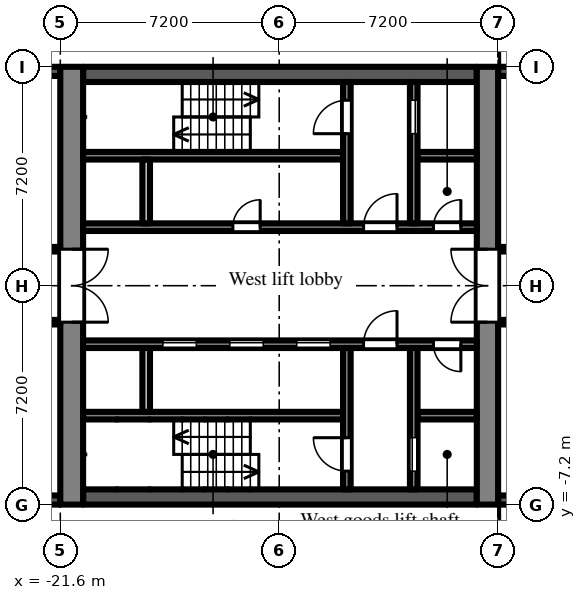
"""IFC4 building model, lengths in metres.
Left out: names, types, materials, properties, quantities, classifications, styles, units other than length and angle.
Written with IfcOpenShell. Run it as: python <this file> out.ifc"""

import sys

from ifc_helpers import new_model, si_unit, direction, frame, frame_2d, origin, place, context, subcontext, project, spatial, rectangle, extrude, element, fill, save


model = new_model("IFC4")
c1 = context("Model", 3, precision=1e-05, world=origin(), true_north=direction((0.0, 1.0)))
c2 = subcontext(c1, "Body", "Model", "MODEL_VIEW")
j1 = project(units=[si_unit("LENGTHUNIT", "METRE"), si_unit("PLANEANGLEUNIT", "RADIAN")], contexts=[c1])
p1 = place(None, origin())
s1 = spatial("IfcSite", under=j1, at=p1, CompositionType="ELEMENT")
p2 = place(p1, origin())
s2 = spatial("IfcBuilding", under=s1, at=p2, CompositionType="ELEMENT")
p3 = place(p2, frame((0.0, 0.0, 11.7)))
s3 = spatial("IfcBuildingStorey", under=s2, at=p3, CompositionType="ELEMENT", Elevation=11.7)
p4 = place(p3, frame((-4.2, 7.05, 0.0), z_axis=(0.0, 0.0, 1.0), x_axis=(-1.0, 0.0, 0.0)))
e1 = element("IfcWall", 1, at=p4, inside=s3, PredefinedType="SOLIDWALL", context=c2, shape_type="SweptSolid", body=[
    extrude(rectangle(XDim=3.0, YDim=0.3, at=frame_2d((1.5, 0.0))), origin(), (0.0, 0.0, 1.0), 2.1),
])
p5 = place(p3, frame((-21.6, 7.05, 0.0), z_axis=(0.0, 0.0, 1.0), x_axis=(-1.0, 0.0, 0.0)))
e2 = element("IfcWall", 2, at=p5, inside=s3, PredefinedType="SOLIDWALL", context=c2, shape_type="SweptSolid", body=[
    extrude(rectangle(XDim=2.7, YDim=0.3, at=frame_2d((1.35, 0.0))), origin(), (0.0, 0.0, 1.0), 2.1),
])
p6 = place(p5, frame((0.75, 0.0, 0.2)))
e3 = element("IfcOpeningElement", 3, at=p6, cuts=e2, PredefinedType="OPENING", context=c2, shape_type="SweptSolid", body=[
    extrude(rectangle(XDim=1.2, YDim=1.85, at=frame_2d((0.6, 0.925))), frame((0.0, 0.16, 0.0), z_axis=(0.0, -1.0, 0.0), x_axis=(1.0, 0.0, 0.0)), (0.0, 0.0, 1.0), 0.32),
])
p7 = place(p3, frame((-24.3, -7.05, 0.0), z_axis=(0.0, 0.0, 1.0), x_axis=(1.0, 0.0, 0.0)))
e4 = element("IfcWall", 4, at=p7, inside=s3, PredefinedType="SOLIDWALL", context=c2, shape_type="SweptSolid", body=[
    extrude(rectangle(XDim=2.7, YDim=0.3, at=frame_2d((1.35, 0.0))), origin(), (0.0, 0.0, 1.0), 2.1),
])
p8 = place(p7, frame((0.75, 0.0, 0.2)))
e5 = element("IfcOpeningElement", 5, at=p8, cuts=e4, PredefinedType="OPENING", context=c2, shape_type="SweptSolid", body=[
    extrude(rectangle(XDim=1.2, YDim=1.85, at=frame_2d((0.6, 0.925))), frame((0.0, 0.16, 0.0), z_axis=(0.0, -1.0, 0.0), x_axis=(1.0, 0.0, 0.0)), (0.0, 0.0, 1.0), 0.32),
])
p9 = place(p3, frame((-7.2, -7.05, 0.0), z_axis=(0.0, 0.0, 1.0), x_axis=(1.0, 0.0, 0.0)))
e6 = element("IfcWall", 6, at=p9, inside=s3, PredefinedType="SOLIDWALL", context=c2, shape_type="SweptSolid", body=[
    extrude(rectangle(XDim=3.0, YDim=0.3, at=frame_2d((1.5, 0.0))), origin(), (0.0, 0.0, 1.0), 2.1),
])
p10 = place(p3, frame((-7.55, -7.2, 0.0), z_axis=(0.0, 0.0, 1.0), x_axis=(0.0, 1.0, 0.0)))
e7 = element("IfcWall", 7, at=p10, inside=s3, PredefinedType="SHEAR", context=c2, shape_type="SweptSolid", body=[
    extrude(rectangle(XDim=14.4, YDim=0.7, at=frame_2d((7.2, 0.0))), origin(), (0.0, 0.0, 1.0), 2.575),
])
p11 = place(p10, frame((6.0, 0.0, 0.0)))
e8 = element("IfcOpeningElement", 8, at=p11, cuts=e7, PredefinedType="OPENING", context=c2, shape_type="SweptSolid", body=[
    extrude(rectangle(XDim=2.4, YDim=2.2, at=frame_2d((1.2, 1.1))), frame((0.0, 0.36, 0.0), z_axis=(0.0, -1.0, 0.0), x_axis=(1.0, 0.0, 0.0)), (0.0, 0.0, 1.0), 0.72),
])
p12 = place(p3, frame((-21.225, -7.2, 0.0), z_axis=(0.0, 0.0, 1.0), x_axis=(0.0, 1.0, 0.0)))
e9 = element("IfcWall", 9, at=p12, inside=s3, PredefinedType="SHEAR", context=c2, shape_type="SweptSolid", body=[
    extrude(rectangle(XDim=14.4, YDim=0.75, at=frame_2d((7.2, 0.0))), origin(), (0.0, 0.0, 1.0), 2.575),
])
p13 = place(p12, frame((6.0, 0.0, 0.0)))
e10 = element("IfcOpeningElement", 10, at=p13, cuts=e9, PredefinedType="OPENING", context=c2, shape_type="SweptSolid", body=[
    extrude(rectangle(XDim=2.4, YDim=2.2, at=frame_2d((1.2, 1.1))), frame((0.0, 0.385, 0.0), z_axis=(0.0, -1.0, 0.0), x_axis=(1.0, 0.0, 0.0)), (0.0, 0.0, 1.0), 0.77),
])
p14 = place(p3, frame((-7.9, 6.95, 0.0), z_axis=(0.0, 0.0, 1.0), x_axis=(-1.0, 0.0, 0.0)))
e11 = element("IfcWall", 11, at=p14, inside=s3, PredefinedType="SHEAR", context=c2, shape_type="SweptSolid", body=[
    extrude(rectangle(XDim=12.95, YDim=0.5, at=frame_2d((6.475, 0.0))), origin(), (0.0, 0.0, 1.0), 2.575),
])
p15 = place(p3, frame((-7.9, 1.925, 0.0), z_axis=(0.0, 0.0, 1.0), x_axis=(-1.0, 0.0, 0.0)))
e12 = element("IfcWall", 12, at=p15, inside=s3, PredefinedType="SHEAR", context=c2, shape_type="SweptSolid", body=[
    extrude(rectangle(XDim=12.95, YDim=0.25, at=frame_2d((6.475, 0.0))), origin(), (0.0, 0.0, 1.0), 2.575),
])
p16 = place(p15, frame((0.525, 0.0, 0.0)))
e13 = element("IfcOpeningElement", 13, at=p16, cuts=e12, PredefinedType="OPENING", context=c2, shape_type="SweptSolid", body=[
    extrude(rectangle(XDim=0.9, YDim=2.1, at=frame_2d((0.45, 1.05))), frame((0.0, 0.135, 0.0), z_axis=(0.0, -1.0, 0.0), x_axis=(1.0, 0.0, 0.0)), (0.0, 0.0, 1.0), 0.27),
])
p17 = place(p15, frame((2.625, 0.0, 0.0)))
e14 = element("IfcOpeningElement", 14, at=p17, cuts=e12, PredefinedType="OPENING", context=c2, shape_type="SweptSolid", body=[
    extrude(rectangle(XDim=1.1, YDim=2.1, at=frame_2d((0.55, 1.05))), frame((0.0, 0.135, 0.0), z_axis=(0.0, -1.0, 0.0), x_axis=(1.0, 0.0, 0.0)), (0.0, 0.0, 1.0), 0.27),
])
p18 = place(p15, frame((7.125, 0.0, 0.0)))
e15 = element("IfcOpeningElement", 15, at=p18, cuts=e12, PredefinedType="OPENING", context=c2, shape_type="SweptSolid", body=[
    extrude(rectangle(XDim=0.9, YDim=2.1, at=frame_2d((0.45, 1.05))), frame((0.0, 0.135, 0.0), z_axis=(0.0, -1.0, 0.0), x_axis=(1.0, 0.0, 0.0)), (0.0, 0.0, 1.0), 0.27),
])
p19 = place(p3, frame((-7.9, 4.275, 0.0), z_axis=(0.0, 0.0, 1.0), x_axis=(-1.0, 0.0, 0.0)))
e16 = element("IfcWall", 16, at=p19, inside=s3, PredefinedType="SHEAR", context=c2, shape_type="SweptSolid", body=[
    extrude(rectangle(XDim=1.95, YDim=0.25, at=frame_2d((0.975, 0.0))), origin(), (0.0, 0.0, 1.0), 2.575),
])
p20 = place(p3, frame((-12.3, 4.275, 0.0), z_axis=(0.0, 0.0, 1.0), x_axis=(-1.0, 0.0, 0.0)))
e17 = element("IfcWall", 17, at=p20, inside=s3, PredefinedType="SHEAR", context=c2, shape_type="SweptSolid", body=[
    extrude(rectangle(XDim=8.55, YDim=0.25, at=frame_2d((4.275, 0.0))), origin(), (0.0, 0.0, 1.0), 2.575),
])
p21 = place(p3, frame((-9.975, 2.05, 0.0), z_axis=(0.0, 0.0, 1.0), x_axis=(0.0, 1.0, 0.0)))
e18 = element("IfcWall", 18, at=p21, inside=s3, PredefinedType="SHEAR", context=c2, shape_type="SweptSolid", body=[
    extrude(rectangle(XDim=4.65, YDim=0.25, at=frame_2d((2.325, 0.0))), origin(), (0.0, 0.0, 1.0), 2.575),
])
p22 = place(p21, frame((2.95, 0.0, 0.0)))
e19 = element("IfcOpeningElement", 19, at=p22, cuts=e18, PredefinedType="OPENING", context=c2, shape_type="SweptSolid", body=[
    extrude(rectangle(XDim=1.1, YDim=2.1, at=frame_2d((0.55, 1.05))), frame((0.0, 0.135, 0.0), z_axis=(0.0, -1.0, 0.0), x_axis=(1.0, 0.0, 0.0)), (0.0, 0.0, 1.0), 0.27),
])
p23 = place(p3, frame((-12.175, 2.05, 0.0), z_axis=(0.0, 0.0, 1.0), x_axis=(0.0, 1.0, 0.0)))
e20 = element("IfcWall", 20, at=p23, inside=s3, PredefinedType="SHEAR", context=c2, shape_type="SweptSolid", body=[
    extrude(rectangle(XDim=4.65, YDim=0.25, at=frame_2d((2.325, 0.0))), origin(), (0.0, 0.0, 1.0), 2.575),
])
p24 = place(p23, frame((2.95, 0.0, 0.0)))
e21 = element("IfcOpeningElement", 21, at=p24, cuts=e20, PredefinedType="OPENING", context=c2, shape_type="SweptSolid", body=[
    extrude(rectangle(XDim=1.1, YDim=2.1, at=frame_2d((0.55, 1.05))), frame((0.0, 0.135, 0.0), z_axis=(0.0, -1.0, 0.0), x_axis=(1.0, 0.0, 0.0)), (0.0, 0.0, 1.0), 0.27),
])
p25 = place(p3, frame((-18.775, 2.05, 0.0), z_axis=(0.0, 0.0, 1.0), x_axis=(0.0, 1.0, 0.0)))
e22 = element("IfcWall", 22, at=p25, inside=s3, PredefinedType="PARTITIONING", context=c2, shape_type="SweptSolid", body=[
    extrude(rectangle(XDim=2.1, YDim=0.25, at=frame_2d((1.05, 0.0))), origin(), (0.0, 0.0, 1.0), 2.575),
])
p26 = place(p3, frame((-7.9, -6.95, 0.0), z_axis=(0.0, 0.0, 1.0), x_axis=(-1.0, 0.0, 0.0)))
e23 = element("IfcWall", 23, at=p26, inside=s3, PredefinedType="SHEAR", context=c2, shape_type="SweptSolid", body=[
    extrude(rectangle(XDim=12.95, YDim=0.5, at=frame_2d((6.475, 0.0))), origin(), (0.0, 0.0, 1.0), 2.575),
])
p27 = place(p3, frame((-7.9, -1.925, 0.0), z_axis=(0.0, 0.0, 1.0), x_axis=(-1.0, 0.0, 0.0)))
e24 = element("IfcWall", 24, at=p27, inside=s3, PredefinedType="SHEAR", context=c2, shape_type="SweptSolid", body=[
    extrude(rectangle(XDim=12.95, YDim=0.25, at=frame_2d((6.475, 0.0))), origin(), (0.0, 0.0, 1.0), 2.575),
])
p28 = place(p27, frame((4.825, 0.0, 0.0)))
e25 = element("IfcOpeningElement", 25, at=p28, cuts=e24, PredefinedType="OPENING", context=c2, shape_type="SweptSolid", body=[
    extrude(rectangle(XDim=1.1, YDim=2.1, at=frame_2d((0.55, 1.05))), frame((0.0, 0.135, 0.0), z_axis=(0.0, -1.0, 0.0), x_axis=(1.0, 0.0, 0.0)), (0.0, 0.0, 1.0), 0.27),
])
p29 = place(p27, frame((7.025, 0.0, 0.0)))
e26 = element("IfcOpeningElement", 26, at=p29, cuts=e24, PredefinedType="OPENING", context=c2, shape_type="SweptSolid", body=[
    extrude(rectangle(XDim=1.1, YDim=2.1, at=frame_2d((0.55, 1.05))), frame((0.0, 0.135, 0.0), z_axis=(0.0, -1.0, 0.0), x_axis=(1.0, 0.0, 0.0)), (0.0, 0.0, 1.0), 0.27),
])
p30 = place(p27, frame((9.225, 0.0, 0.0)))
e27 = element("IfcOpeningElement", 27, at=p30, cuts=e24, PredefinedType="OPENING", context=c2, shape_type="SweptSolid", body=[
    extrude(rectangle(XDim=1.1, YDim=2.1, at=frame_2d((0.55, 1.05))), frame((0.0, 0.135, 0.0), z_axis=(0.0, -1.0, 0.0), x_axis=(1.0, 0.0, 0.0)), (0.0, 0.0, 1.0), 0.27),
])
p31 = place(p27, frame((0.525, 0.0, 0.0)))
e28 = element("IfcOpeningElement", 28, at=p31, cuts=e24, PredefinedType="OPENING", context=c2, shape_type="SweptSolid", body=[
    extrude(rectangle(XDim=0.9, YDim=2.1, at=frame_2d((0.45, 1.05))), frame((0.0, 0.135, 0.0), z_axis=(0.0, -1.0, 0.0), x_axis=(1.0, 0.0, 0.0)), (0.0, 0.0, 1.0), 0.27),
])
p32 = place(p27, frame((2.625, 0.0, 0.0)))
e29 = element("IfcOpeningElement", 29, at=p32, cuts=e24, PredefinedType="OPENING", context=c2, shape_type="SweptSolid", body=[
    extrude(rectangle(XDim=1.1, YDim=2.1, at=frame_2d((0.55, 1.05))), frame((0.0, 0.135, 0.0), z_axis=(0.0, -1.0, 0.0), x_axis=(1.0, 0.0, 0.0)), (0.0, 0.0, 1.0), 0.27),
])
p33 = place(p3, frame((-7.9, -4.275, 0.0), z_axis=(0.0, 0.0, 1.0), x_axis=(-1.0, 0.0, 0.0)))
e30 = element("IfcWall", 30, at=p33, inside=s3, PredefinedType="SHEAR", context=c2, shape_type="SweptSolid", body=[
    extrude(rectangle(XDim=1.95, YDim=0.25, at=frame_2d((0.975, 0.0))), origin(), (0.0, 0.0, 1.0), 2.575),
])
p34 = place(p3, frame((-12.3, -4.275, 0.0), z_axis=(0.0, 0.0, 1.0), x_axis=(-1.0, 0.0, 0.0)))
e31 = element("IfcWall", 31, at=p34, inside=s3, PredefinedType="SHEAR", context=c2, shape_type="SweptSolid", body=[
    extrude(rectangle(XDim=8.55, YDim=0.25, at=frame_2d((4.275, 0.0))), origin(), (0.0, 0.0, 1.0), 2.575),
])
p35 = place(p3, frame((-9.975, -2.05, 0.0), z_axis=(0.0, 0.0, 1.0), x_axis=(0.0, -1.0, 0.0)))
e32 = element("IfcWall", 32, at=p35, inside=s3, PredefinedType="SHEAR", context=c2, shape_type="SweptSolid", body=[
    extrude(rectangle(XDim=4.65, YDim=0.25, at=frame_2d((2.325, 0.0))), origin(), (0.0, 0.0, 1.0), 2.575),
])
p36 = place(p35, frame((2.95, 0.0, 0.0)))
e33 = element("IfcOpeningElement", 33, at=p36, cuts=e32, PredefinedType="OPENING", context=c2, shape_type="SweptSolid", body=[
    extrude(rectangle(XDim=1.1, YDim=2.1, at=frame_2d((0.55, 1.05))), frame((0.0, 0.135, 0.0), z_axis=(0.0, -1.0, 0.0), x_axis=(1.0, 0.0, 0.0)), (0.0, 0.0, 1.0), 0.27),
])
p37 = place(p3, frame((-12.175, -2.05, 0.0), z_axis=(0.0, 0.0, 1.0), x_axis=(0.0, -1.0, 0.0)))
e34 = element("IfcWall", 34, at=p37, inside=s3, PredefinedType="SHEAR", context=c2, shape_type="SweptSolid", body=[
    extrude(rectangle(XDim=4.65, YDim=0.25, at=frame_2d((2.325, 0.0))), origin(), (0.0, 0.0, 1.0), 2.575),
])
p38 = place(p37, frame((2.95, 0.0, 0.0)))
e35 = element("IfcOpeningElement", 35, at=p38, cuts=e34, PredefinedType="OPENING", context=c2, shape_type="SweptSolid", body=[
    extrude(rectangle(XDim=1.1, YDim=2.1, at=frame_2d((0.55, 1.05))), frame((0.0, 0.135, 0.0), z_axis=(0.0, -1.0, 0.0), x_axis=(1.0, 0.0, 0.0)), (0.0, 0.0, 1.0), 0.27),
])
p39 = place(p3, frame((-18.775, -2.05, 0.0), z_axis=(0.0, 0.0, 1.0), x_axis=(0.0, -1.0, 0.0)))
e36 = element("IfcWall", 36, at=p39, inside=s3, PredefinedType="PARTITIONING", context=c2, shape_type="SweptSolid", body=[
    extrude(rectangle(XDim=2.1, YDim=0.25, at=frame_2d((1.05, 0.0))), origin(), (0.0, 0.0, 1.0), 2.575),
])
p40 = place(p3, frame((-36.5, -1.2, 0.0), z_axis=(0.0, 0.0, 1.0), x_axis=(1.0, 0.0, 0.0)))
e37 = element("IfcWall", 37, at=p40, inside=s3, PredefinedType="PARTITIONING", context=c2, shape_type="SweptSolid", body=[
    extrude(rectangle(XDim=14.9, YDim=0.15, at=frame_2d((7.45, 0.0))), origin(), (0.0, 0.0, 1.0), 2.575),
])
p41 = place(p40, frame((10.4, 0.0, 0.0)))
e38 = element("IfcOpeningElement", 38, at=p41, cuts=e37, PredefinedType="OPENING", context=c2, shape_type="SweptSolid", body=[
    extrude(rectangle(XDim=1.8, YDim=2.1, at=frame_2d((0.9, 1.05))), frame((0.0, 0.085, 0.0), z_axis=(0.0, -1.0, 0.0), x_axis=(1.0, 0.0, 0.0)), (0.0, 0.0, 1.0), 0.17),
])
p42 = place(p40, frame((6.35, 0.0, 0.0)))
e39 = element("IfcOpeningElement", 39, at=p42, cuts=e37, PredefinedType="OPENING", context=c2, shape_type="SweptSolid", body=[
    extrude(rectangle(XDim=0.9, YDim=2.1, at=frame_2d((0.45, 1.05))), frame((0.0, 0.085, 0.0), z_axis=(0.0, -1.0, 0.0), x_axis=(1.0, 0.0, 0.0)), (0.0, 0.0, 1.0), 0.17),
])
p43 = place(p40, frame((4.55, 0.0, 0.0)))
e40 = element("IfcOpeningElement", 40, at=p43, cuts=e37, PredefinedType="OPENING", context=c2, shape_type="SweptSolid", body=[
    extrude(rectangle(XDim=0.9, YDim=2.1, at=frame_2d((0.45, 1.05))), frame((0.0, 0.085, 0.0), z_axis=(0.0, -1.0, 0.0), x_axis=(1.0, 0.0, 0.0)), (0.0, 0.0, 1.0), 0.17),
])
p44 = place(p40, frame((1.15, 0.0, 0.0)))
e41 = element("IfcOpeningElement", 41, at=p44, cuts=e37, PredefinedType="OPENING", context=c2, shape_type="SweptSolid", body=[
    extrude(rectangle(XDim=1.8, YDim=2.1, at=frame_2d((0.9, 1.05))), frame((0.0, 0.085, 0.0), z_axis=(0.0, -1.0, 0.0), x_axis=(1.0, 0.0, 0.0)), (0.0, 0.0, 1.0), 0.17),
])
p45 = place(p3, frame((-36.5, 1.2, 0.0), z_axis=(0.0, 0.0, 1.0), x_axis=(1.0, 0.0, 0.0)))
e42 = element("IfcWall", 42, at=p45, inside=s3, PredefinedType="PARTITIONING", context=c2, shape_type="SweptSolid", body=[
    extrude(rectangle(XDim=14.9, YDim=0.15, at=frame_2d((7.45, 0.0))), origin(), (0.0, 0.0, 1.0), 2.575),
])
p46 = place(p45, frame((10.4, 0.0, 0.0)))
e43 = element("IfcOpeningElement", 43, at=p46, cuts=e42, PredefinedType="OPENING", context=c2, shape_type="SweptSolid", body=[
    extrude(rectangle(XDim=1.8, YDim=2.1, at=frame_2d((0.9, 1.05))), frame((0.0, 0.085, 0.0), z_axis=(0.0, -1.0, 0.0), x_axis=(1.0, 0.0, 0.0)), (0.0, 0.0, 1.0), 0.17),
])
p47 = place(p45, frame((5.45, 0.0, 0.0)))
e44 = element("IfcOpeningElement", 44, at=p47, cuts=e42, PredefinedType="OPENING", context=c2, shape_type="SweptSolid", body=[
    extrude(rectangle(XDim=0.9, YDim=2.1, at=frame_2d((0.45, 1.05))), frame((0.0, 0.085, 0.0), z_axis=(0.0, -1.0, 0.0), x_axis=(1.0, 0.0, 0.0)), (0.0, 0.0, 1.0), 0.17),
])
p48 = place(p45, frame((1.15, 0.0, 0.0)))
e45 = element("IfcOpeningElement", 45, at=p48, cuts=e42, PredefinedType="OPENING", context=c2, shape_type="SweptSolid", body=[
    extrude(rectangle(XDim=1.8, YDim=2.1, at=frame_2d((0.9, 1.05))), frame((0.0, 0.085, 0.0), z_axis=(0.0, -1.0, 0.0), x_axis=(1.0, 0.0, 0.0)), (0.0, 0.0, 1.0), 0.17),
])
p49 = place(p3, frame((-7.2, -1.2, 0.0), z_axis=(0.0, 0.0, 1.0), x_axis=(1.0, 0.0, 0.0)))
e46 = element("IfcWall", 46, at=p49, inside=s3, PredefinedType="PARTITIONING", context=c2, shape_type="SweptSolid", body=[
    extrude(rectangle(XDim=5.925, YDim=0.15, at=frame_2d((2.962, 0.0))), origin(), (0.0, 0.0, 1.0), 2.575),
])
p50 = place(p49, frame((1.05, 0.0, 0.0)))
e47 = element("IfcOpeningElement", 47, at=p50, cuts=e46, PredefinedType="OPENING", context=c2, shape_type="SweptSolid", body=[
    extrude(rectangle(XDim=0.9, YDim=2.1, at=frame_2d((0.45, 1.05))), frame((0.0, 0.085, 0.0), z_axis=(0.0, -1.0, 0.0), x_axis=(1.0, 0.0, 0.0)), (0.0, 0.0, 1.0), 0.17),
])
p51 = place(p3, frame((-7.2, 1.2, 0.0), z_axis=(0.0, 0.0, 1.0), x_axis=(1.0, 0.0, 0.0)))
e48 = element("IfcWall", 48, at=p51, inside=s3, PredefinedType="PARTITIONING", context=c2, shape_type="SweptSolid", body=[
    extrude(rectangle(XDim=5.925, YDim=0.15, at=frame_2d((2.962, 0.0))), origin(), (0.0, 0.0, 1.0), 2.575),
])
p52 = place(p51, frame((1.55, 0.0, 0.0)))
e49 = element("IfcOpeningElement", 49, at=p52, cuts=e48, PredefinedType="OPENING", context=c2, shape_type="SweptSolid", body=[
    extrude(rectangle(XDim=0.9, YDim=2.1, at=frame_2d((0.45, 1.05))), frame((0.0, 0.085, 0.0), z_axis=(0.0, -1.0, 0.0), x_axis=(1.0, 0.0, 0.0)), (0.0, 0.0, 1.0), 0.17),
])
p53 = place(p28, origin())
e50 = element("IfcDoor", 50, at=p53, inside=s3, OperationType="SLIDING_TO_LEFT", PredefinedType="DOOR", context=c2, shape_type="SweptSolid", body=[
    extrude(rectangle(XDim=1.1, YDim=2.1, at=frame_2d((0.55, 1.05))), frame((0.0, 0.025, 0.0), z_axis=(0.0, -1.0, 0.0), x_axis=(1.0, 0.0, 0.0)), (0.0, 0.0, 1.0), 0.05),
])
fill(e25, e50)
p54 = place(p29, origin())
e51 = element("IfcDoor", 51, at=p54, inside=s3, OperationType="SLIDING_TO_LEFT", PredefinedType="DOOR", context=c2, shape_type="SweptSolid", body=[
    extrude(rectangle(XDim=1.1, YDim=2.1, at=frame_2d((0.55, 1.05))), frame((0.0, 0.025, 0.0), z_axis=(0.0, -1.0, 0.0), x_axis=(1.0, 0.0, 0.0)), (0.0, 0.0, 1.0), 0.05),
])
fill(e26, e51)
p55 = place(p30, origin())
e52 = element("IfcDoor", 52, at=p55, inside=s3, OperationType="SLIDING_TO_LEFT", PredefinedType="DOOR", context=c2, shape_type="SweptSolid", body=[
    extrude(rectangle(XDim=1.1, YDim=2.1, at=frame_2d((0.55, 1.05))), frame((0.0, 0.025, 0.0), z_axis=(0.0, -1.0, 0.0), x_axis=(1.0, 0.0, 0.0)), (0.0, 0.0, 1.0), 0.05),
])
fill(e27, e52)
p56 = place(p22, origin())
e53 = element("IfcDoor", 53, at=p56, inside=s3, OperationType="SLIDING_TO_LEFT", PredefinedType="DOOR", context=c2, shape_type="SweptSolid", body=[
    extrude(rectangle(XDim=1.1, YDim=2.1, at=frame_2d((0.55, 1.05))), frame((0.0, 0.025, 0.0), z_axis=(0.0, -1.0, 0.0), x_axis=(1.0, 0.0, 0.0)), (0.0, 0.0, 1.0), 0.05),
])
fill(e19, e53)
p57 = place(p36, origin())
e54 = element("IfcDoor", 54, at=p57, inside=s3, OperationType="SLIDING_TO_LEFT", PredefinedType="DOOR", context=c2, shape_type="SweptSolid", body=[
    extrude(rectangle(XDim=1.1, YDim=2.1, at=frame_2d((0.55, 1.05))), frame((0.0, 0.025, 0.0), z_axis=(0.0, -1.0, 0.0), x_axis=(1.0, 0.0, 0.0)), (0.0, 0.0, 1.0), 0.05),
])
fill(e33, e54)
p58 = place(p24, origin())
e55 = element("IfcDoor", 55, at=p58, inside=s3, OperationType="SINGLE_SWING_LEFT", PredefinedType="DOOR", context=c2, shape_type="SweptSolid", body=[
    extrude(rectangle(XDim=1.1, YDim=2.1, at=frame_2d((0.55, 1.05))), frame((0.0, 0.025, 0.0), z_axis=(0.0, -1.0, 0.0), x_axis=(1.0, 0.0, 0.0)), (0.0, 0.0, 1.0), 0.05),
])
fill(e21, e55)
p59 = place(p38, frame((1.1, 0.0, 0.0), z_axis=(0.0, 0.0, 1.0), x_axis=(-1.0, 0.0, 0.0)))
e56 = element("IfcDoor", 56, at=p59, inside=s3, OperationType="SINGLE_SWING_RIGHT", PredefinedType="DOOR", context=c2, shape_type="SweptSolid", body=[
    extrude(rectangle(XDim=1.1, YDim=2.1, at=frame_2d((0.55, 1.05))), frame((0.0, 0.025, 0.0), z_axis=(0.0, -1.0, 0.0), x_axis=(1.0, 0.0, 0.0)), (0.0, 0.0, 1.0), 0.05),
])
fill(e35, e56)
p60 = place(p16, frame((0.9, 0.0, 0.0), z_axis=(0.0, 0.0, 1.0), x_axis=(-1.0, 0.0, 0.0)))
e57 = element("IfcDoor", 57, at=p60, inside=s3, OperationType="SINGLE_SWING_RIGHT", PredefinedType="DOOR", context=c2, shape_type="SweptSolid", body=[
    extrude(rectangle(XDim=0.9, YDim=2.1, at=frame_2d((0.45, 1.05))), frame((0.0, 0.025, 0.0), z_axis=(0.0, -1.0, 0.0), x_axis=(1.0, 0.0, 0.0)), (0.0, 0.0, 1.0), 0.05),
])
fill(e13, e57)
p61 = place(p31, origin())
e58 = element("IfcDoor", 58, at=p61, inside=s3, OperationType="SINGLE_SWING_LEFT", PredefinedType="DOOR", context=c2, shape_type="SweptSolid", body=[
    extrude(rectangle(XDim=0.9, YDim=2.1, at=frame_2d((0.45, 1.05))), frame((0.0, 0.025, 0.0), z_axis=(0.0, -1.0, 0.0), x_axis=(1.0, 0.0, 0.0)), (0.0, 0.0, 1.0), 0.05),
])
fill(e28, e58)
p62 = place(p17, frame((1.1, 0.0, 0.0), z_axis=(0.0, 0.0, 1.0), x_axis=(-1.0, 0.0, 0.0)))
e59 = element("IfcDoor", 59, at=p62, inside=s3, OperationType="SINGLE_SWING_RIGHT", PredefinedType="DOOR", context=c2, shape_type="SweptSolid", body=[
    extrude(rectangle(XDim=1.1, YDim=2.1, at=frame_2d((0.55, 1.05))), frame((0.0, 0.025, 0.0), z_axis=(0.0, -1.0, 0.0), x_axis=(1.0, 0.0, 0.0)), (0.0, 0.0, 1.0), 0.05),
])
fill(e14, e59)
p63 = place(p32, frame((1.1, 0.0, 0.0), z_axis=(0.0, 0.0, 1.0), x_axis=(-1.0, 0.0, 0.0)))
e60 = element("IfcDoor", 60, at=p63, inside=s3, OperationType="SINGLE_SWING_RIGHT", PredefinedType="DOOR", context=c2, shape_type="SweptSolid", body=[
    extrude(rectangle(XDim=1.1, YDim=2.1, at=frame_2d((0.55, 1.05))), frame((0.0, 0.025, 0.0), z_axis=(0.0, -1.0, 0.0), x_axis=(1.0, 0.0, 0.0)), (0.0, 0.0, 1.0), 0.05),
])
fill(e29, e60)
p64 = place(p11, origin())
e61 = element("IfcDoor", 61, at=p64, inside=s3, OperationType="DOUBLE_DOOR_DOUBLE_SWING", PredefinedType="DOOR", context=c2, shape_type="SweptSolid", body=[
    extrude(rectangle(XDim=2.4, YDim=2.2, at=frame_2d((1.2, 1.1))), frame((0.0, 0.025, 0.0), z_axis=(0.0, -1.0, 0.0), x_axis=(1.0, 0.0, 0.0)), (0.0, 0.0, 1.0), 0.05),
])
fill(e8, e61)
p65 = place(p13, frame((2.4, 0.0, 0.0), z_axis=(0.0, 0.0, 1.0), x_axis=(-1.0, 0.0, 0.0)))
e62 = element("IfcDoor", 62, at=p65, inside=s3, OperationType="DOUBLE_DOOR_DOUBLE_SWING", PredefinedType="DOOR", context=c2, shape_type="SweptSolid", body=[
    extrude(rectangle(XDim=2.4, YDim=2.2, at=frame_2d((1.2, 1.1))), frame((0.0, 0.025, 0.0), z_axis=(0.0, -1.0, 0.0), x_axis=(1.0, 0.0, 0.0)), (0.0, 0.0, 1.0), 0.05),
])
fill(e10, e62)
p66 = place(p18, frame((0.9, 0.0, 0.0), z_axis=(0.0, 0.0, 1.0), x_axis=(-1.0, 0.0, 0.0)))
e63 = element("IfcDoor", 63, at=p66, inside=s3, OperationType="SINGLE_SWING_RIGHT", PredefinedType="DOOR", context=c2, shape_type="SweptSolid", body=[
    extrude(rectangle(XDim=0.9, YDim=2.1, at=frame_2d((0.45, 1.05))), frame((0.0, 0.025, 0.0), z_axis=(0.0, -1.0, 0.0), x_axis=(1.0, 0.0, 0.0)), (0.0, 0.0, 1.0), 0.05),
])
fill(e15, e63)
save(model, sys.argv[1])
